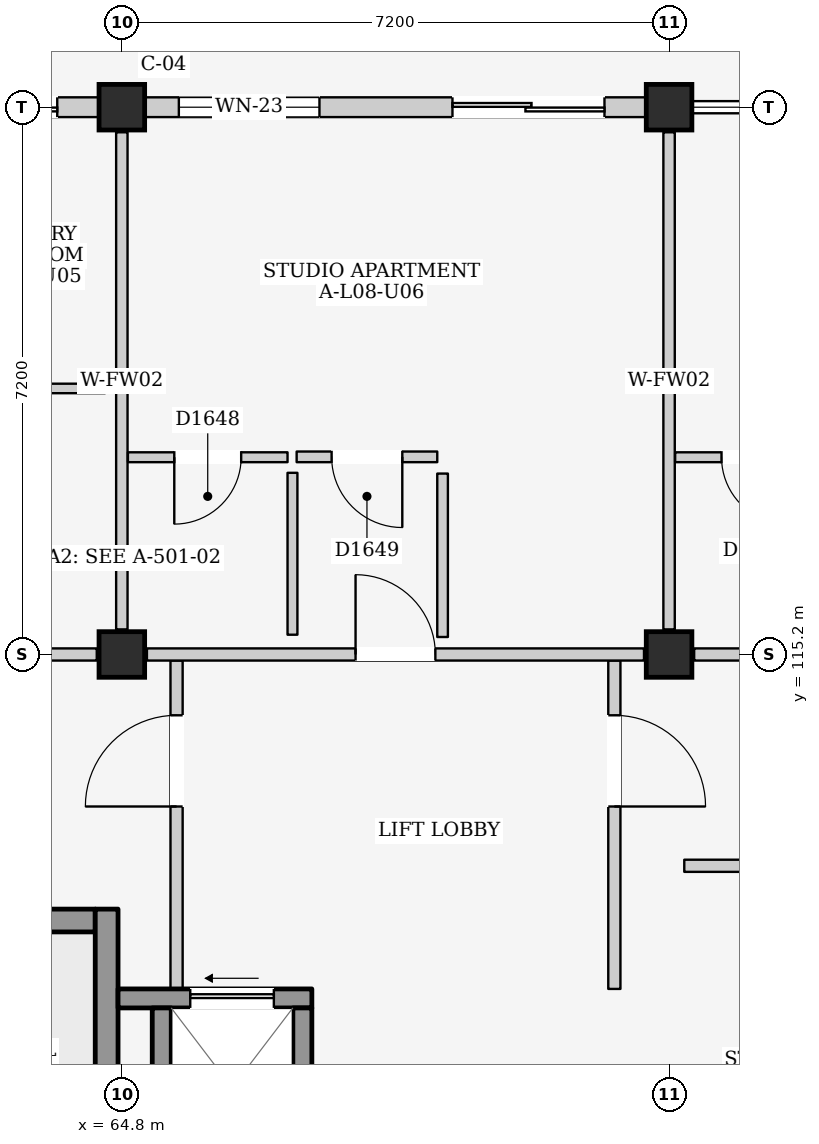
"""IFC4 building model, lengths in metres.
Left out: names, types, materials, properties, quantities, classifications, styles, units other than length and angle.
Written with IfcOpenShell. Run it as: python <this file> out.ifc"""

import sys

from ifc_helpers import new_model, si_unit, direction, frame, frame_2d, origin, origin_2d, place, context, subcontext, project, spatial, rectangle, extrude, element, fill, save


model = new_model("IFC4")
c1 = context("Model", 3, precision=1e-05, world=origin(), true_north=direction((0.0, 1.0)))
c2 = subcontext(c1, "Body", "Model", "MODEL_VIEW")
j1 = project(units=[si_unit("LENGTHUNIT", "METRE"), si_unit("PLANEANGLEUNIT", "RADIAN")], contexts=[c1])
p1 = place(None, origin())
s1 = spatial("IfcSite", under=j1, at=p1, CompositionType="ELEMENT")
p2 = place(p1, origin())
s2 = spatial("IfcBuilding", under=s1, at=p2, CompositionType="ELEMENT")
p3 = place(p2, frame((0.0, 0.0, 28.3)))
s3 = spatial("IfcBuildingStorey", under=s2, at=p3, CompositionType="ELEMENT", Elevation=28.3)
for number, where, z_axis, x_axis in (
    (1, (64.8, 115.2, 0.0), (0.0, 0.0, 1.0), (1.0, 0.0, 0.0)),
    (2, (64.8, 122.4, 0.0), (0.0, 0.0, 1.0), (1.0, 0.0, 0.0)),
    (3, (72.0, 115.2, 0.0), (0.0, 0.0, 1.0), (1.0, 0.0, 0.0)),
    (4, (72.0, 122.4, 0.0), (0.0, 0.0, 1.0), (1.0, 0.0, 0.0)),
):
    element("IfcColumn", number, at=place(p3, frame(where, z_axis=z_axis, x_axis=x_axis)), inside=s3, PredefinedType="COLUMN", context=c2, shape_type="SweptSolid", body=[
        extrude(rectangle(XDim=0.6, YDim=0.6, at=origin_2d()), origin(), (0.0, 0.0, 1.0), 3.2),
    ])
p4 = place(p3, frame((57.9, 122.4, 0.0), z_axis=(0.0, 0.0, 1.0), x_axis=(1.0, 0.0, 0.0)))
e5 = element("IfcWall", 5, at=p4, inside=s3, PredefinedType="ELEMENTEDWALL", context=c2, shape_type="SweptSolid", body=[
    extrude(rectangle(XDim=6.6, YDim=0.26, at=frame_2d((3.3, 0.0))), origin(), (0.0, 0.0, 1.0), 2.485),
])
p5 = place(p4, frame((3.65, 0.0, 0.0)))
e6 = element("IfcOpeningElement", 6, at=p5, cuts=e5, PredefinedType="OPENING", context=c2, shape_type="SweptSolid", body=[
    extrude(rectangle(XDim=2.4, YDim=2.12, at=frame_2d((1.2, 1.06))), frame((0.0, 0.145, 0.0), z_axis=(0.0, -1.0, 0.0), x_axis=(1.0, 0.0, 0.0)), (0.0, 0.0, 1.0), 0.29),
])
p6 = place(p4, frame((0.45, 0.0, 0.9)))
e7 = element("IfcOpeningElement", 7, at=p6, cuts=e5, PredefinedType="OPENING", context=c2, shape_type="SweptSolid", body=[
    extrude(rectangle(XDim=1.55, YDim=1.45, at=frame_2d((0.775, 0.725))), frame((0.0, 0.145, 0.0), z_axis=(0.0, -1.0, 0.0), x_axis=(1.0, 0.0, 0.0)), (0.0, 0.0, 1.0), 0.29),
])
p7 = place(p3, frame((65.1, 122.4, 0.0), z_axis=(0.0, 0.0, 1.0), x_axis=(1.0, 0.0, 0.0)))
e8 = element("IfcWall", 8, at=p7, inside=s3, PredefinedType="ELEMENTEDWALL", context=c2, shape_type="SweptSolid", body=[
    extrude(rectangle(XDim=6.6, YDim=0.26, at=frame_2d((3.3, 0.0))), origin(), (0.0, 0.0, 1.0), 2.485),
])
p8 = place(p7, frame((4.05, 0.0, 0.0)))
e9 = element("IfcOpeningElement", 9, at=p8, cuts=e8, PredefinedType="OPENING", context=c2, shape_type="SweptSolid", body=[
    extrude(rectangle(XDim=2.0, YDim=2.12, at=frame_2d((1.0, 1.06))), frame((0.0, 0.145, 0.0), z_axis=(0.0, -1.0, 0.0), x_axis=(1.0, 0.0, 0.0)), (0.0, 0.0, 1.0), 0.29),
])
p9 = place(p7, frame((0.45, 0.0, 0.9)))
e10 = element("IfcOpeningElement", 10, at=p9, cuts=e8, PredefinedType="OPENING", context=c2, shape_type="SweptSolid", body=[
    extrude(rectangle(XDim=1.85, YDim=1.4, at=frame_2d((0.925, 0.7))), frame((0.0, 0.145, 0.0), z_axis=(0.0, -1.0, 0.0), x_axis=(1.0, 0.0, 0.0)), (0.0, 0.0, 1.0), 0.29),
])
p10 = place(p3, frame((57.95, 111.7, 0.0), z_axis=(0.0, 0.0, 1.0), x_axis=(1.0, 0.0, 0.0)))
e11 = element("IfcWall", 11, at=p10, inside=s3, PredefinedType="SHEAR", context=c2, shape_type="SweptSolid", body=[
    extrude(rectangle(XDim=6.5, YDim=0.3, at=frame_2d((3.25, 0.0))), origin(), (0.0, 0.0, 1.0), 2.95),
])
p11 = place(p10, frame((0.18, 0.0, 0.0)))
e12 = element("IfcOpeningElement", 12, at=p11, cuts=e11, PredefinedType="OPENING", context=c2, shape_type="SweptSolid", body=[
    extrude(rectangle(XDim=1.15, YDim=2.2, at=frame_2d((0.575, 1.1))), frame((0.0, 0.165, 0.0), z_axis=(0.0, -1.0, 0.0), x_axis=(1.0, 0.0, 0.0)), (0.0, 0.0, 1.0), 0.33),
])
p12 = place(p3, frame((64.6, 108.15, 0.0), z_axis=(0.0, 0.0, 1.0), x_axis=(0.0, 1.0, 0.0)))
e13 = element("IfcWall", 13, at=p12, inside=s3, PredefinedType="SHEAR", context=c2, shape_type="SweptSolid", body=[
    extrude(rectangle(XDim=3.7, YDim=0.3, at=frame_2d((1.85, 0.0))), origin(), (0.0, 0.0, 1.0), 2.95),
])
p13 = place(p3, frame((65.52, 110.8, 0.0), z_axis=(0.0, 0.0, 1.0), x_axis=(0.0, 1.0, 0.0)))
e14 = element("IfcWall", 14, at=p13, inside=s3, PredefinedType="PARTITIONING", context=c2, shape_type="SweptSolid", body=[
    extrude(rectangle(XDim=4.32, YDim=0.16, at=frame_2d((2.16, 0.0))), origin(), (0.0, 0.0, 1.0), 2.95),
])
p14 = place(p13, frame((2.4, 0.0, 0.0)))
e15 = element("IfcOpeningElement", 15, at=p14, cuts=e14, PredefinedType="OPENING", context=c2, shape_type="SweptSolid", body=[
    extrude(rectangle(XDim=1.2, YDim=2.2, at=frame_2d((0.6, 1.1))), frame((0.0, 0.095, 0.0), z_axis=(0.0, -1.0, 0.0), x_axis=(1.0, 0.0, 0.0)), (0.0, 0.0, 1.0), 0.19),
])
p15 = place(p3, frame((71.28, 110.8, 0.0), z_axis=(0.0, 0.0, 1.0), x_axis=(0.0, 1.0, 0.0)))
e16 = element("IfcWall", 16, at=p15, inside=s3, PredefinedType="PARTITIONING", context=c2, shape_type="SweptSolid", body=[
    extrude(rectangle(XDim=4.32, YDim=0.16, at=frame_2d((2.16, 0.0))), origin(), (0.0, 0.0, 1.0), 2.95),
])
p16 = place(p15, frame((2.4, 0.0, 0.0)))
e17 = element("IfcOpeningElement", 17, at=p16, cuts=e16, PredefinedType="OPENING", context=c2, shape_type="SweptSolid", body=[
    extrude(rectangle(XDim=1.2, YDim=2.2, at=frame_2d((0.6, 1.1))), frame((0.0, 0.095, 0.0), z_axis=(0.0, -1.0, 0.0), x_axis=(1.0, 0.0, 0.0)), (0.0, 0.0, 1.0), 0.19),
])
p17 = place(p3, frame((64.75, 110.675, 0.0), z_axis=(0.0, 0.0, 1.0), x_axis=(1.0, 0.0, 0.0)))
e18 = element("IfcWall", 18, at=p17, inside=s3, PredefinedType="SHEAR", context=c2, shape_type="SweptSolid", body=[
    extrude(rectangle(XDim=2.55, YDim=0.25, at=frame_2d((1.275, 0.0))), origin(), (0.0, 0.0, 1.0), 2.95),
])
p18 = place(p17, frame((0.95, 0.0, 0.0)))
e19 = element("IfcOpeningElement", 19, at=p18, cuts=e18, PredefinedType="OPENING", context=c2, shape_type="SweptSolid", body=[
    extrude(rectangle(XDim=1.1, YDim=2.15, at=frame_2d((0.55, 1.075))), frame((0.0, 0.14, 0.0), z_axis=(0.0, -1.0, 0.0), x_axis=(1.0, 0.0, 0.0)), (0.0, 0.0, 1.0), 0.28),
])
for number, where, z_axis, x_axis in (
    (20, (65.325, 108.45, 0.0), (0.0, 0.0, 1.0), (0.0, 1.0, 0.0)),
    (21, (67.175, 108.45, 0.0), (0.0, 0.0, 1.0), (0.0, 1.0, 0.0)),
):
    element("IfcWall", number, at=place(p3, frame(where, z_axis=z_axis, x_axis=x_axis)), inside=s3, PredefinedType="SHEAR", context=c2, shape_type="SweptSolid", body=[
        extrude(rectangle(XDim=2.1, YDim=0.25, at=frame_2d((1.05, 0.0))), origin(), (0.0, 0.0, 1.0), 2.95),
    ])
p19 = place(p3, frame((57.93, 115.2, 0.0), z_axis=(0.0, 0.0, 1.0), x_axis=(1.0, 0.0, 0.0)))
e22 = element("IfcWall", 22, at=p19, inside=s3, PredefinedType="PARTITIONING", context=c2, shape_type="SweptSolid", body=[
    extrude(rectangle(XDim=6.54, YDim=0.16, at=frame_2d((3.27, 0.0))), origin(), (0.0, 0.0, 1.0), 2.285),
])
p20 = place(p19, frame((2.745, 0.0, 0.0)))
e23 = element("IfcOpeningElement", 23, at=p20, cuts=e22, PredefinedType="OPENING", context=c2, shape_type="SweptSolid", body=[
    extrude(rectangle(XDim=1.05, YDim=2.15, at=frame_2d((0.525, 1.075))), frame((0.0, 0.095, 0.0), z_axis=(0.0, -1.0, 0.0), x_axis=(1.0, 0.0, 0.0)), (0.0, 0.0, 1.0), 0.19),
])
p21 = place(p3, frame((64.8, 115.53, 0.0), z_axis=(0.0, 0.0, 1.0), x_axis=(0.0, 1.0, 0.0)))
e24 = element("IfcWall", 24, at=p21, inside=s3, PredefinedType="PARTITIONING", context=c2, shape_type="SweptSolid", body=[
    extrude(rectangle(XDim=6.54, YDim=0.15, at=frame_2d((3.27, 0.0))), origin(), (0.0, 0.0, 1.0), 2.435),
])
p22 = place(p3, frame((61.52, 118.7, 0.0), z_axis=(0.0, 0.0, 1.0), x_axis=(1.0, 0.0, 0.0)))
e25 = element("IfcWall", 25, at=p22, inside=s3, PredefinedType="PARTITIONING", context=c2, shape_type="SweptSolid", body=[
    extrude(rectangle(XDim=3.06, YDim=0.125, at=frame_2d((1.53, 0.0))), origin(), (0.0, 0.0, 1.0), 2.95),
])
p23 = place(p3, frame((65.13, 115.2, 0.0), z_axis=(0.0, 0.0, 1.0), x_axis=(1.0, 0.0, 0.0)))
e26 = element("IfcWall", 26, at=p23, inside=s3, PredefinedType="PARTITIONING", context=c2, shape_type="SweptSolid", body=[
    extrude(rectangle(XDim=6.54, YDim=0.16, at=frame_2d((3.27, 0.0))), origin(), (0.0, 0.0, 1.0), 2.285),
])
p24 = place(p23, frame((2.745, 0.0, 0.0)))
e27 = element("IfcOpeningElement", 27, at=p24, cuts=e26, PredefinedType="OPENING", context=c2, shape_type="SweptSolid", body=[
    extrude(rectangle(XDim=1.05, YDim=2.15, at=frame_2d((0.525, 1.075))), frame((0.0, 0.095, 0.0), z_axis=(0.0, -1.0, 0.0), x_axis=(1.0, 0.0, 0.0)), (0.0, 0.0, 1.0), 0.19),
])
p25 = place(p3, frame((72.0, 115.53, 0.0), z_axis=(0.0, 0.0, 1.0), x_axis=(0.0, 1.0, 0.0)))
e28 = element("IfcWall", 28, at=p25, inside=s3, PredefinedType="PARTITIONING", context=c2, shape_type="SweptSolid", body=[
    extrude(rectangle(XDim=6.54, YDim=0.15, at=frame_2d((3.27, 0.0))), origin(), (0.0, 0.0, 1.0), 2.435),
])
p26 = place(p3, frame((64.88, 117.795, 0.0), z_axis=(0.0, 0.0, 1.0), x_axis=(1.0, 0.0, 0.0)))
e29 = element("IfcWall", 29, at=p26, inside=s3, PredefinedType="PARTITIONING", context=c2, shape_type="SweptSolid", body=[
    extrude(rectangle(XDim=2.1, YDim=0.13, at=frame_2d((1.05, 0.0))), origin(), (0.0, 0.0, 1.0), 2.95),
])
p27 = place(p26, frame((0.61, 0.0, 0.0)))
e30 = element("IfcOpeningElement", 30, at=p27, cuts=e29, PredefinedType="OPENING", context=c2, shape_type="SweptSolid", body=[
    extrude(rectangle(XDim=0.88, YDim=2.1, at=frame_2d((0.44, 1.05))), frame((0.0, 0.08, 0.0), z_axis=(0.0, -1.0, 0.0), x_axis=(1.0, 0.0, 0.0)), (0.0, 0.0, 1.0), 0.16),
])
p28 = place(p3, frame((67.045, 115.46, 0.0), z_axis=(0.0, 0.0, 1.0), x_axis=(0.0, 1.0, 0.0)))
e31 = element("IfcWall", 31, at=p28, inside=s3, PredefinedType="PARTITIONING", context=c2, shape_type="SweptSolid", body=[
    extrude(rectangle(XDim=2.13, YDim=0.13, at=frame_2d((1.065, 0.0))), origin(), (0.0, 0.0, 1.0), 2.95),
])
p29 = place(p3, frame((67.1, 117.8, 0.0), z_axis=(0.0, 0.0, 1.0), x_axis=(1.0, 0.0, 0.0)))
e32 = element("IfcWall", 32, at=p29, inside=s3, PredefinedType="PARTITIONING", context=c2, shape_type="SweptSolid", body=[
    extrude(rectangle(XDim=1.85, YDim=0.14, at=frame_2d((0.925, 0.0))), origin(), (0.0, 0.0, 1.0), 2.95),
])
p30 = place(p29, frame((0.46, 0.0, 0.0)))
e33 = element("IfcOpeningElement", 33, at=p30, cuts=e32, PredefinedType="OPENING", context=c2, shape_type="SweptSolid", body=[
    extrude(rectangle(XDim=0.93, YDim=2.14, at=frame_2d((0.465, 1.07))), frame((0.0, 0.085, 0.0), z_axis=(0.0, -1.0, 0.0), x_axis=(1.0, 0.0, 0.0)), (0.0, 0.0, 1.0), 0.17),
])
p31 = place(p3, frame((69.02, 115.43, 0.0), z_axis=(0.0, 0.0, 1.0), x_axis=(0.0, 1.0, 0.0)))
e34 = element("IfcWall", 34, at=p31, inside=s3, PredefinedType="PARTITIONING", context=c2, shape_type="SweptSolid", body=[
    extrude(rectangle(XDim=2.15, YDim=0.14, at=frame_2d((1.075, 0.0))), origin(), (0.0, 0.0, 1.0), 2.95),
])
p32 = place(p3, frame((72.33, 115.2, 0.0), z_axis=(0.0, 0.0, 1.0), x_axis=(1.0, 0.0, 0.0)))
e35 = element("IfcWall", 35, at=p32, inside=s3, PredefinedType="PARTITIONING", context=c2, shape_type="SweptSolid", body=[
    extrude(rectangle(XDim=6.54, YDim=0.16, at=frame_2d((3.27, 0.0))), origin(), (0.0, 0.0, 1.0), 2.285),
])
p33 = place(p32, frame((2.745, 0.0, 0.0)))
e36 = element("IfcOpeningElement", 36, at=p33, cuts=e35, PredefinedType="OPENING", context=c2, shape_type="SweptSolid", body=[
    extrude(rectangle(XDim=1.05, YDim=2.15, at=frame_2d((0.525, 1.075))), frame((0.0, 0.095, 0.0), z_axis=(0.0, -1.0, 0.0), x_axis=(1.0, 0.0, 0.0)), (0.0, 0.0, 1.0), 0.19),
])
p34 = place(p3, frame((72.08, 117.795, 0.0), z_axis=(0.0, 0.0, 1.0), x_axis=(1.0, 0.0, 0.0)))
e37 = element("IfcWall", 37, at=p34, inside=s3, PredefinedType="PARTITIONING", context=c2, shape_type="SweptSolid", body=[
    extrude(rectangle(XDim=2.1, YDim=0.13, at=frame_2d((1.05, 0.0))), origin(), (0.0, 0.0, 1.0), 2.95),
])
p35 = place(p34, frame((0.61, 0.0, 0.0)))
e38 = element("IfcOpeningElement", 38, at=p35, cuts=e37, PredefinedType="OPENING", context=c2, shape_type="SweptSolid", body=[
    extrude(rectangle(XDim=0.88, YDim=2.1, at=frame_2d((0.44, 1.05))), frame((0.0, 0.08, 0.0), z_axis=(0.0, -1.0, 0.0), x_axis=(1.0, 0.0, 0.0)), (0.0, 0.0, 1.0), 0.16),
])
p36 = place(p3, frame((72.2, 112.42, 0.0), z_axis=(0.0, 0.0, 1.0), x_axis=(1.0, 0.0, 0.0)))
e39 = element("IfcWall", 39, at=p36, inside=s3, PredefinedType="PARTITIONING", context=c2, shape_type="SweptSolid", body=[
    extrude(rectangle(XDim=6.8, YDim=0.16, at=frame_2d((3.4, 0.0))), origin(), (0.0, 0.0, 1.0), 2.95),
])
p37 = place(p36, frame((2.86, 0.0, 0.0)))
e40 = element("IfcOpeningElement", 40, at=p37, cuts=e39, PredefinedType="OPENING", context=c2, shape_type="SweptSolid", body=[
    extrude(rectangle(XDim=1.08, YDim=2.22, at=frame_2d((0.54, 1.11))), frame((0.0, 0.095, 0.0), z_axis=(0.0, -1.0, 0.0), x_axis=(1.0, 0.0, 0.0)), (0.0, 0.0, 1.0), 0.19),
])
p38 = place(p5, frame((2.4, 0.0, 0.0), z_axis=(0.0, 0.0, 1.0), x_axis=(-1.0, 0.0, 0.0)))
e41 = element("IfcDoor", 41, at=p38, inside=s3, OperationType="DOUBLE_DOOR_SLIDING", PredefinedType="DOOR", context=c2, shape_type="SweptSolid", body=[
    extrude(rectangle(XDim=2.4, YDim=2.12, at=frame_2d((1.2, 1.06))), frame((0.0, 0.025, 0.0), z_axis=(0.0, -1.0, 0.0), x_axis=(1.0, 0.0, 0.0)), (0.0, 0.0, 1.0), 0.05),
])
fill(e6, e41)
p39 = place(p8, frame((2.0, 0.0, 0.0), z_axis=(0.0, 0.0, 1.0), x_axis=(-1.0, 0.0, 0.0)))
e42 = element("IfcDoor", 42, at=p39, inside=s3, OperationType="DOUBLE_DOOR_SLIDING", PredefinedType="DOOR", context=c2, shape_type="SweptSolid", body=[
    extrude(rectangle(XDim=2.0, YDim=2.12, at=frame_2d((1.0, 1.06))), frame((0.0, 0.025, 0.0), z_axis=(0.0, -1.0, 0.0), x_axis=(1.0, 0.0, 0.0)), (0.0, 0.0, 1.0), 0.05),
])
fill(e9, e42)
p40 = place(p9, origin())
e43 = element("IfcWindow", 43, at=p40, inside=s3, PartitioningType="DOUBLE_PANEL_VERTICAL", PredefinedType="WINDOW", context=c2, shape_type="SweptSolid", body=[
    extrude(rectangle(XDim=1.85, YDim=1.4, at=frame_2d((0.925, 0.7))), frame((0.0, 0.03, 0.0), z_axis=(0.0, -1.0, 0.0), x_axis=(1.0, 0.0, 0.0)), (0.0, 0.0, 1.0), 0.06),
])
fill(e10, e43)
p41 = place(p14, origin())
e44 = element("IfcDoor", 44, at=p41, inside=s3, OperationType="SINGLE_SWING_LEFT", PredefinedType="DOOR", context=c2, shape_type="SweptSolid", body=[
    extrude(rectangle(XDim=1.2, YDim=2.2, at=frame_2d((0.6, 1.1))), frame((0.0, 0.025, 0.0), z_axis=(0.0, -1.0, 0.0), x_axis=(1.0, 0.0, 0.0)), (0.0, 0.0, 1.0), 0.05),
])
fill(e15, e44)
p42 = place(p16, frame((1.2, 0.0, 0.0), z_axis=(0.0, 0.0, 1.0), x_axis=(-1.0, 0.0, 0.0)))
e45 = element("IfcDoor", 45, at=p42, inside=s3, OperationType="SINGLE_SWING_RIGHT", PredefinedType="DOOR", context=c2, shape_type="SweptSolid", body=[
    extrude(rectangle(XDim=1.2, YDim=2.2, at=frame_2d((0.6, 1.1))), frame((0.0, 0.025, 0.0), z_axis=(0.0, -1.0, 0.0), x_axis=(1.0, 0.0, 0.0)), (0.0, 0.0, 1.0), 0.05),
])
fill(e17, e45)
p43 = place(p18, origin())
e46 = element("IfcDoor", 46, at=p43, inside=s3, OperationType="SLIDING_TO_LEFT", PredefinedType="DOOR", context=c2, shape_type="SweptSolid", body=[
    extrude(rectangle(XDim=1.1, YDim=2.15, at=frame_2d((0.55, 1.075))), frame((0.0, 0.025, 0.0), z_axis=(0.0, -1.0, 0.0), x_axis=(1.0, 0.0, 0.0)), (0.0, 0.0, 1.0), 0.05),
])
fill(e19, e46)
p44 = place(p24, origin())
e47 = element("IfcDoor", 47, at=p44, inside=s3, OperationType="SINGLE_SWING_LEFT", PredefinedType="DOOR", context=c2, shape_type="SweptSolid", body=[
    extrude(rectangle(XDim=1.05, YDim=2.15, at=frame_2d((0.525, 1.075))), frame((0.0, 0.025, 0.0), z_axis=(0.0, -1.0, 0.0), x_axis=(1.0, 0.0, 0.0)), (0.0, 0.0, 1.0), 0.05),
])
fill(e27, e47)
p45 = place(p27, frame((0.88, 0.0, 0.0), z_axis=(0.0, 0.0, 1.0), x_axis=(-1.0, 0.0, 0.0)))
e48 = element("IfcDoor", 48, at=p45, inside=s3, OperationType="SINGLE_SWING_RIGHT", PredefinedType="DOOR", context=c2, shape_type="SweptSolid", body=[
    extrude(rectangle(XDim=0.88, YDim=2.1, at=frame_2d((0.44, 1.05))), frame((0.0, 0.025, 0.0), z_axis=(0.0, -1.0, 0.0), x_axis=(1.0, 0.0, 0.0)), (0.0, 0.0, 1.0), 0.05),
])
fill(e30, e48)
p46 = place(p30, frame((0.93, 0.0, 0.0), z_axis=(0.0, 0.0, 1.0), x_axis=(-1.0, 0.0, 0.0)))
e49 = element("IfcDoor", 49, at=p46, inside=s3, OperationType="SINGLE_SWING_LEFT", PredefinedType="DOOR", context=c2, shape_type="SweptSolid", body=[
    extrude(rectangle(XDim=0.93, YDim=2.14, at=frame_2d((0.465, 1.07))), frame((0.0, 0.025, 0.0), z_axis=(0.0, -1.0, 0.0), x_axis=(1.0, 0.0, 0.0)), (0.0, 0.0, 1.0), 0.05),
])
fill(e33, e49)
p47 = place(p35, frame((0.88, 0.0, 0.0), z_axis=(0.0, 0.0, 1.0), x_axis=(-1.0, 0.0, 0.0)))
e50 = element("IfcDoor", 50, at=p47, inside=s3, OperationType="SINGLE_SWING_LEFT", PredefinedType="DOOR", context=c2, shape_type="SweptSolid", body=[
    extrude(rectangle(XDim=0.88, YDim=2.1, at=frame_2d((0.44, 1.05))), frame((0.0, 0.025, 0.0), z_axis=(0.0, -1.0, 0.0), x_axis=(1.0, 0.0, 0.0)), (0.0, 0.0, 1.0), 0.05),
])
fill(e38, e50)
save(model, sys.argv[1])
